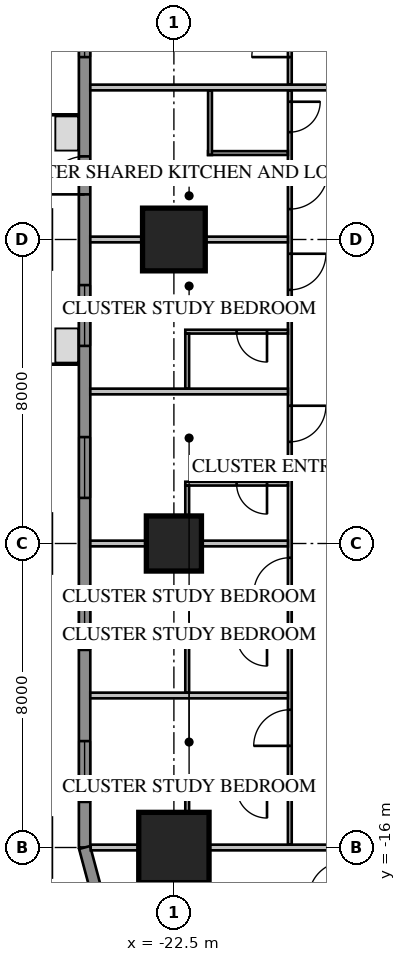
"""IFC4 building model, lengths in metres.
Left out: names, types, materials, properties, quantities, classifications, styles, units other than length and angle.
Written with IfcOpenShell. Run it as: python <this file> out.ifc"""

import sys

from ifc_helpers import new_model, si_unit, direction, frame, frame_2d, origin, origin_2d, place, context, subcontext, project, spatial, rectangle, extrude, element, fill, save


model = new_model("IFC4")
c1 = context("Model", 3, precision=1e-05, world=origin(), true_north=direction((0.0, 1.0)))
c2 = subcontext(c1, "Body", "Model", "MODEL_VIEW")
j1 = project(units=[si_unit("LENGTHUNIT", "METRE"), si_unit("PLANEANGLEUNIT", "RADIAN")], contexts=[c1])
p1 = place(None, origin())
s1 = spatial("IfcSite", under=j1, at=p1, CompositionType="ELEMENT")
p2 = place(p1, origin())
s2 = spatial("IfcBuilding", under=s1, at=p2, CompositionType="ELEMENT")
p3 = place(p2, frame((0.0, 0.0, 19.85)))
s3 = spatial("IfcBuildingStorey", under=s2, at=p3, CompositionType="ELEMENT", Elevation=19.85)
p4 = place(p3, frame((-22.5, 0.0, 0.0), z_axis=(0.0, 0.0, 1.0), x_axis=(1.0, 0.0, 0.0)))
e1 = element("IfcColumn", 1, at=p4, inside=s3, PredefinedType="COLUMN", context=c2, shape_type="SweptSolid", body=[
    extrude(rectangle(XDim=1.65, YDim=1.65, at=origin_2d()), origin(), (0.0, 0.0, 1.0), 3.85),
])
p5 = place(p3, frame((-22.5, -8.0, 0.0), z_axis=(0.0, 0.0, 1.0), x_axis=(1.0, 0.0, 0.0)))
e2 = element("IfcColumn", 2, at=p5, inside=s3, PredefinedType="COLUMN", context=c2, shape_type="SweptSolid", body=[
    extrude(rectangle(XDim=1.45, YDim=1.45, at=origin_2d()), origin(), (0.0, 0.0, 1.0), 3.85),
])
p6 = place(p3, frame((-22.5, -16.0, 0.0), z_axis=(0.0, 0.0, 1.0), x_axis=(1.0, 0.0, 0.0)))
e3 = element("IfcColumn", 3, at=p6, inside=s3, PredefinedType="COLUMN", context=c2, shape_type="SweptSolid", body=[
    extrude(rectangle(XDim=1.85, YDim=1.85, at=origin_2d()), origin(), (0.0, 0.0, 1.0), 3.85),
])
p7 = place(p3, frame((-24.85, 16.0, 0.0), z_axis=(0.0, 0.0, 1.0), x_axis=(0.0, -1.0, 0.0)))
e4 = element("IfcWall", 4, at=p7, inside=s3, PredefinedType="SOLIDWALL", context=c2, shape_type="SweptSolid", body=[
    extrude(rectangle(XDim=32.0, YDim=0.3, at=frame_2d((16.0, 0.0))), origin(), (0.0, 0.0, 1.0), 3.65),
])
p8 = place(p7, frame((1.2, 0.0, 0.75)))
e5 = element("IfcOpeningElement", 5, at=p8, cuts=e4, PredefinedType="OPENING", context=c2, shape_type="SweptSolid", body=[
    extrude(rectangle(XDim=1.6, YDim=1.8, at=frame_2d((0.8, 0.9))), frame((0.0, 0.17, 0.0), z_axis=(0.0, -1.0, 0.0), x_axis=(1.0, 0.0, 0.0)), (0.0, 0.0, 1.0), 0.34),
])
p9 = place(p7, frame((5.2, 0.0, 0.75)))
e6 = element("IfcOpeningElement", 6, at=p9, cuts=e4, PredefinedType="OPENING", context=c2, shape_type="SweptSolid", body=[
    extrude(rectangle(XDim=1.6, YDim=1.8, at=frame_2d((0.8, 0.9))), frame((0.0, 0.17, 0.0), z_axis=(0.0, -1.0, 0.0), x_axis=(1.0, 0.0, 0.0)), (0.0, 0.0, 1.0), 0.34),
])
p10 = place(p7, frame((17.2, 0.0, 0.75)))
e7 = element("IfcOpeningElement", 7, at=p10, cuts=e4, PredefinedType="OPENING", context=c2, shape_type="SweptSolid", body=[
    extrude(rectangle(XDim=1.6, YDim=1.8, at=frame_2d((0.8, 0.9))), frame((0.0, 0.17, 0.0), z_axis=(0.0, -1.0, 0.0), x_axis=(1.0, 0.0, 0.0)), (0.0, 0.0, 1.0), 0.34),
])
p11 = place(p7, frame((21.2, 0.0, 0.75)))
e8 = element("IfcOpeningElement", 8, at=p11, cuts=e4, PredefinedType="OPENING", context=c2, shape_type="SweptSolid", body=[
    extrude(rectangle(XDim=1.6, YDim=1.8, at=frame_2d((0.8, 0.9))), frame((0.0, 0.17, 0.0), z_axis=(0.0, -1.0, 0.0), x_axis=(1.0, 0.0, 0.0)), (0.0, 0.0, 1.0), 0.34),
])
p12 = place(p7, frame((25.2, 0.0, 0.75)))
e9 = element("IfcOpeningElement", 9, at=p12, cuts=e4, PredefinedType="OPENING", context=c2, shape_type="SweptSolid", body=[
    extrude(rectangle(XDim=1.6, YDim=1.8, at=frame_2d((0.8, 0.9))), frame((0.0, 0.17, 0.0), z_axis=(0.0, -1.0, 0.0), x_axis=(1.0, 0.0, 0.0)), (0.0, 0.0, 1.0), 0.34),
])
p13 = place(p7, frame((29.2, 0.0, 0.75)))
e10 = element("IfcOpeningElement", 10, at=p13, cuts=e4, PredefinedType="OPENING", context=c2, shape_type="SweptSolid", body=[
    extrude(rectangle(XDim=1.6, YDim=1.8, at=frame_2d((0.8, 0.9))), frame((0.0, 0.17, 0.0), z_axis=(0.0, -1.0, 0.0), x_axis=(1.0, 0.0, 0.0)), (0.0, 0.0, 1.0), 0.34),
])
p14 = place(p7, frame((8.8, 0.0, 0.75)))
e11 = element("IfcOpeningElement", 11, at=p14, cuts=e4, PredefinedType="OPENING", context=c2, shape_type="SweptSolid", body=[
    extrude(rectangle(XDim=2.4, YDim=1.8, at=frame_2d((1.2, 0.9))), frame((0.0, 0.17, 0.0), z_axis=(0.0, -1.0, 0.0), x_axis=(1.0, 0.0, 0.0)), (0.0, 0.0, 1.0), 0.34),
])
p15 = place(p7, frame((13.812, 0.0, 0.0)))
e12 = element("IfcOpeningElement", 12, at=p15, cuts=e4, PredefinedType="OPENING", context=c2, shape_type="SweptSolid", body=[
    extrude(rectangle(XDim=1.0, YDim=2.4, at=frame_2d((0.5, 1.2))), frame((0.0, 0.17, 0.0), z_axis=(0.0, -1.0, 0.0), x_axis=(1.0, 0.0, 0.0)), (0.0, 0.0, 1.0), 0.34),
])
p16 = place(p3, frame((-24.85, -16.0, 0.0), z_axis=(0.0, 0.0, 1.0), x_axis=(0.258839972501, -0.965920218567, 0.0)))
e13 = element("IfcWall", 13, at=p16, inside=s3, PredefinedType="SOLIDWALL", context=c2, shape_type="SweptSolid", body=[
    extrude(rectangle(XDim=4.581, YDim=0.3, at=frame_2d((2.291, 0.0))), origin(), (0.0, 0.0, 1.0), 3.65),
])
p17 = place(p3, frame((-19.45, 15.925, 0.0), z_axis=(0.0, 0.0, 1.0), x_axis=(0.0, -1.0, 0.0)))
e14 = element("IfcWall", 14, at=p17, inside=s3, PredefinedType="PARTITIONING", context=c2, shape_type="SweptSolid", body=[
    extrude(rectangle(XDim=11.85, YDim=0.1, at=frame_2d((5.925, 0.0))), origin(), (0.0, 0.0, 1.0), 3.65),
])
p18 = place(p17, frame((10.125, 0.0, 0.0)))
e15 = element("IfcOpeningElement", 15, at=p18, cuts=e14, PredefinedType="OPENING", context=c2, shape_type="SweptSolid", body=[
    extrude(rectangle(XDim=1.0, YDim=2.1, at=frame_2d((0.5, 1.05))), frame((0.0, 0.07, 0.0), z_axis=(0.0, -1.0, 0.0), x_axis=(1.0, 0.0, 0.0)), (0.0, 0.0, 1.0), 0.14),
])
p19 = place(p17, frame((8.3, 0.0, 0.0)))
e16 = element("IfcOpeningElement", 16, at=p19, cuts=e14, PredefinedType="OPENING", context=c2, shape_type="SweptSolid", body=[
    extrude(rectangle(XDim=0.8, YDim=2.1, at=frame_2d((0.4, 1.05))), frame((0.0, 0.07, 0.0), z_axis=(0.0, -1.0, 0.0), x_axis=(1.0, 0.0, 0.0)), (0.0, 0.0, 1.0), 0.14),
])
p20 = place(p17, frame((0.3, 0.0, 0.0)))
e17 = element("IfcOpeningElement", 17, at=p20, cuts=e14, PredefinedType="OPENING", context=c2, shape_type="SweptSolid", body=[
    extrude(rectangle(XDim=0.95, YDim=2.1, at=frame_2d((0.475, 1.05))), frame((0.0, 0.07, 0.0), z_axis=(0.0, -1.0, 0.0), x_axis=(1.0, 0.0, 0.0)), (0.0, 0.0, 1.0), 0.14),
])
p21 = place(p17, frame((4.3, 0.0, 0.0)))
e18 = element("IfcOpeningElement", 18, at=p21, cuts=e14, PredefinedType="OPENING", context=c2, shape_type="SweptSolid", body=[
    extrude(rectangle(XDim=0.95, YDim=2.1, at=frame_2d((0.475, 1.05))), frame((0.0, 0.07, 0.0), z_axis=(0.0, -1.0, 0.0), x_axis=(1.0, 0.0, 0.0)), (0.0, 0.0, 1.0), 0.14),
])
p22 = place(p3, frame((-19.45, 3.925, 0.0), z_axis=(0.0, 0.0, 1.0), x_axis=(0.0, -1.0, 0.0)))
e19 = element("IfcWall", 19, at=p22, inside=s3, PredefinedType="PARTITIONING", context=c2, shape_type="SweptSolid", body=[
    extrude(rectangle(XDim=19.85, YDim=0.1, at=frame_2d((9.925, 0.0))), origin(), (0.0, 0.0, 1.0), 3.65),
])
p23 = place(p22, frame((2.125, 0.0, 0.0)))
e20 = element("IfcOpeningElement", 20, at=p23, cuts=e19, PredefinedType="OPENING", context=c2, shape_type="SweptSolid", body=[
    extrude(rectangle(XDim=1.0, YDim=2.1, at=frame_2d((0.5, 1.05))), frame((0.0, 0.07, 0.0), z_axis=(0.0, -1.0, 0.0), x_axis=(1.0, 0.0, 0.0)), (0.0, 0.0, 1.0), 0.14),
])
p24 = place(p22, frame((0.3, 0.0, 0.0)))
e21 = element("IfcOpeningElement", 21, at=p24, cuts=e19, PredefinedType="OPENING", context=c2, shape_type="SweptSolid", body=[
    extrude(rectangle(XDim=0.8, YDim=2.1, at=frame_2d((0.4, 1.05))), frame((0.0, 0.07, 0.0), z_axis=(0.0, -1.0, 0.0), x_axis=(1.0, 0.0, 0.0)), (0.0, 0.0, 1.0), 0.14),
])
p25 = place(p22, frame((4.3, 0.0, 0.0)))
e22 = element("IfcOpeningElement", 22, at=p25, cuts=e19, PredefinedType="OPENING", context=c2, shape_type="SweptSolid", body=[
    extrude(rectangle(XDim=0.95, YDim=2.1, at=frame_2d((0.475, 1.05))), frame((0.0, 0.07, 0.0), z_axis=(0.0, -1.0, 0.0), x_axis=(1.0, 0.0, 0.0)), (0.0, 0.0, 1.0), 0.14),
])
p26 = place(p22, frame((8.3, 0.0, 0.0)))
e23 = element("IfcOpeningElement", 23, at=p26, cuts=e19, PredefinedType="OPENING", context=c2, shape_type="SweptSolid", body=[
    extrude(rectangle(XDim=0.95, YDim=2.1, at=frame_2d((0.475, 1.05))), frame((0.0, 0.07, 0.0), z_axis=(0.0, -1.0, 0.0), x_axis=(1.0, 0.0, 0.0)), (0.0, 0.0, 1.0), 0.14),
])
p27 = place(p22, frame((12.3, 0.0, 0.0)))
e24 = element("IfcOpeningElement", 24, at=p27, cuts=e19, PredefinedType="OPENING", context=c2, shape_type="SweptSolid", body=[
    extrude(rectangle(XDim=0.95, YDim=2.1, at=frame_2d((0.475, 1.05))), frame((0.0, 0.07, 0.0), z_axis=(0.0, -1.0, 0.0), x_axis=(1.0, 0.0, 0.0)), (0.0, 0.0, 1.0), 0.14),
])
p28 = place(p22, frame((16.3, 0.0, 0.0)))
e25 = element("IfcOpeningElement", 25, at=p28, cuts=e19, PredefinedType="OPENING", context=c2, shape_type="SweptSolid", body=[
    extrude(rectangle(XDim=0.95, YDim=2.1, at=frame_2d((0.475, 1.05))), frame((0.0, 0.07, 0.0), z_axis=(0.0, -1.0, 0.0), x_axis=(1.0, 0.0, 0.0)), (0.0, 0.0, 1.0), 0.14),
])
p29 = place(p3, frame((-19.5, 2.275, 0.0), z_axis=(0.0, 0.0, 1.0), x_axis=(-1.0, 0.0, 0.0)))
e26 = element("IfcWall", 26, at=p29, inside=s3, PredefinedType="PARTITIONING", context=c2, shape_type="SweptSolid", body=[
    extrude(rectangle(XDim=2.1, YDim=0.1, at=frame_2d((1.05, 0.0))), origin(), (0.0, 0.0, 1.0), 3.65),
])
p30 = place(p3, frame((-21.55, 3.925, 0.0), z_axis=(0.0, 0.0, 1.0), x_axis=(0.0, -1.0, 0.0)))
e27 = element("IfcWall", 27, at=p30, inside=s3, PredefinedType="PARTITIONING", context=c2, shape_type="SweptSolid", body=[
    extrude(rectangle(XDim=1.7, YDim=0.1, at=frame_2d((0.85, 0.0))), origin(), (0.0, 0.0, 1.0), 3.65),
])
p31 = place(p3, frame((-18.1, 4.0, 0.0), z_axis=(0.0, 0.0, 1.0), x_axis=(-1.0, 0.0, 0.0)))
e28 = element("IfcWall", 28, at=p31, inside=s3, PredefinedType="PARTITIONING", context=c2, shape_type="SweptSolid", body=[
    extrude(rectangle(XDim=6.6, YDim=0.15, at=frame_2d((3.3, 0.0))), origin(), (0.0, 0.0, 1.0), 3.65),
])
p32 = place(p3, frame((-19.5, 0.0, 0.0), z_axis=(0.0, 0.0, 1.0), x_axis=(-1.0, 0.0, 0.0)))
e29 = element("IfcWall", 29, at=p32, inside=s3, PredefinedType="PARTITIONING", context=c2, shape_type="SweptSolid", body=[
    extrude(rectangle(XDim=5.2, YDim=0.15, at=frame_2d((2.6, 0.0))), origin(), (0.0, 0.0, 1.0), 2.957),
])
for number, where, z_axis, x_axis in (
    (30, (-19.5, -4.0, 0.0), (0.0, 0.0, 1.0), (-1.0, 0.0, 0.0)),
    (31, (-19.5, -8.0, 0.0), (0.0, 0.0, 1.0), (-1.0, 0.0, 0.0)),
    (32, (-19.5, -12.0, 0.0), (0.0, 0.0, 1.0), (-1.0, 0.0, 0.0)),
):
    element("IfcWall", number, at=place(p3, frame(where, z_axis=z_axis, x_axis=x_axis)), inside=s3, PredefinedType="PARTITIONING", context=c2, shape_type="SweptSolid", body=[
        extrude(rectangle(XDim=5.2, YDim=0.15, at=frame_2d((2.6, 0.0))), origin(), (0.0, 0.0, 1.0), 3.65),
    ])
p33 = place(p3, frame((-18.1, -16.0, 0.0), z_axis=(0.0, 0.0, 1.0), x_axis=(-1.0, 0.0, 0.0)))
e33 = element("IfcWall", 33, at=p33, inside=s3, PredefinedType="PARTITIONING", context=c2, shape_type="SweptSolid", body=[
    extrude(rectangle(XDim=6.589, YDim=0.15, at=frame_2d((3.295, 0.0))), origin(), (0.0, 0.0, 1.0), 3.65),
])
p34 = place(p3, frame((-19.5, -2.425, 0.0), z_axis=(0.0, 0.0, 1.0), x_axis=(-1.0, 0.0, 0.0)))
e34 = element("IfcWall", 34, at=p34, inside=s3, PredefinedType="PARTITIONING", context=c2, shape_type="SweptSolid", body=[
    extrude(rectangle(XDim=2.7, YDim=0.1, at=frame_2d((1.35, 0.0))), origin(), (0.0, 0.0, 1.0), 3.65),
])
p35 = place(p34, frame((0.55, 0.0, 0.0)))
e35 = element("IfcOpeningElement", 35, at=p35, cuts=e34, PredefinedType="OPENING", context=c2, shape_type="SweptSolid", body=[
    extrude(rectangle(XDim=0.8, YDim=2.1, at=frame_2d((0.4, 1.05))), frame((0.0, 0.07, 0.0), z_axis=(0.0, -1.0, 0.0), x_axis=(1.0, 0.0, 0.0)), (0.0, 0.0, 1.0), 0.14),
])
p36 = place(p3, frame((-22.15, -2.475, 0.0), z_axis=(0.0, 0.0, 1.0), x_axis=(0.0, -1.0, 0.0)))
e36 = element("IfcWall", 36, at=p36, inside=s3, PredefinedType="PARTITIONING", context=c2, shape_type="SweptSolid", body=[
    extrude(rectangle(XDim=1.45, YDim=0.1, at=frame_2d((0.725, 0.0))), origin(), (0.0, 0.0, 1.0), 3.65),
])
p37 = place(p3, frame((-19.5, -6.425, 0.0), z_axis=(0.0, 0.0, 1.0), x_axis=(-1.0, 0.0, 0.0)))
e37 = element("IfcWall", 37, at=p37, inside=s3, PredefinedType="PARTITIONING", context=c2, shape_type="SweptSolid", body=[
    extrude(rectangle(XDim=2.7, YDim=0.1, at=frame_2d((1.35, 0.0))), origin(), (0.0, 0.0, 1.0), 3.65),
])
p38 = place(p37, frame((0.55, 0.0, 0.0)))
e38 = element("IfcOpeningElement", 38, at=p38, cuts=e37, PredefinedType="OPENING", context=c2, shape_type="SweptSolid", body=[
    extrude(rectangle(XDim=0.8, YDim=2.1, at=frame_2d((0.4, 1.05))), frame((0.0, 0.07, 0.0), z_axis=(0.0, -1.0, 0.0), x_axis=(1.0, 0.0, 0.0)), (0.0, 0.0, 1.0), 0.14),
])
p39 = place(p3, frame((-22.15, -6.475, 0.0), z_axis=(0.0, 0.0, 1.0), x_axis=(0.0, -1.0, 0.0)))
e39 = element("IfcWall", 39, at=p39, inside=s3, PredefinedType="PARTITIONING", context=c2, shape_type="SweptSolid", body=[
    extrude(rectangle(XDim=1.45, YDim=0.1, at=frame_2d((0.725, 0.0))), origin(), (0.0, 0.0, 1.0), 3.65),
])
p40 = place(p3, frame((-19.5, -10.425, 0.0), z_axis=(0.0, 0.0, 1.0), x_axis=(-1.0, 0.0, 0.0)))
e40 = element("IfcWall", 40, at=p40, inside=s3, PredefinedType="PARTITIONING", context=c2, shape_type="SweptSolid", body=[
    extrude(rectangle(XDim=2.7, YDim=0.1, at=frame_2d((1.35, 0.0))), origin(), (0.0, 0.0, 1.0), 3.65),
])
p41 = place(p40, frame((0.55, 0.0, 0.0)))
e41 = element("IfcOpeningElement", 41, at=p41, cuts=e40, PredefinedType="OPENING", context=c2, shape_type="SweptSolid", body=[
    extrude(rectangle(XDim=0.8, YDim=2.1, at=frame_2d((0.4, 1.05))), frame((0.0, 0.07, 0.0), z_axis=(0.0, -1.0, 0.0), x_axis=(1.0, 0.0, 0.0)), (0.0, 0.0, 1.0), 0.14),
])
p42 = place(p3, frame((-22.15, -10.475, 0.0), z_axis=(0.0, 0.0, 1.0), x_axis=(0.0, -1.0, 0.0)))
e42 = element("IfcWall", 42, at=p42, inside=s3, PredefinedType="PARTITIONING", context=c2, shape_type="SweptSolid", body=[
    extrude(rectangle(XDim=1.45, YDim=0.1, at=frame_2d((0.725, 0.0))), origin(), (0.0, 0.0, 1.0), 3.65),
])
p43 = place(p3, frame((-19.5, -14.425, 0.0), z_axis=(0.0, 0.0, 1.0), x_axis=(-1.0, 0.0, 0.0)))
e43 = element("IfcWall", 43, at=p43, inside=s3, PredefinedType="PARTITIONING", context=c2, shape_type="SweptSolid", body=[
    extrude(rectangle(XDim=2.7, YDim=0.1, at=frame_2d((1.35, 0.0))), origin(), (0.0, 0.0, 1.0), 3.65),
])
p44 = place(p43, frame((0.55, 0.0, 0.0)))
e44 = element("IfcOpeningElement", 44, at=p44, cuts=e43, PredefinedType="OPENING", context=c2, shape_type="SweptSolid", body=[
    extrude(rectangle(XDim=0.8, YDim=2.1, at=frame_2d((0.4, 1.05))), frame((0.0, 0.07, 0.0), z_axis=(0.0, -1.0, 0.0), x_axis=(1.0, 0.0, 0.0)), (0.0, 0.0, 1.0), 0.14),
])
p45 = place(p3, frame((-22.15, -14.475, 0.0), z_axis=(0.0, 0.0, 1.0), x_axis=(0.0, -1.0, 0.0)))
e45 = element("IfcWall", 45, at=p45, inside=s3, PredefinedType="PARTITIONING", context=c2, shape_type="SweptSolid", body=[
    extrude(rectangle(XDim=1.45, YDim=0.1, at=frame_2d((0.725, 0.0))), origin(), (0.0, 0.0, 1.0), 3.65),
])
p46 = place(p10, origin())
e46 = element("IfcWindow", 46, at=p46, inside=s3, PartitioningType="SINGLE_PANEL", PredefinedType="WINDOW", context=c2, shape_type="SweptSolid", body=[
    extrude(rectangle(XDim=1.6, YDim=1.8, at=frame_2d((0.8, 0.9))), frame((0.0, 0.03, 0.0), z_axis=(0.0, -1.0, 0.0), x_axis=(1.0, 0.0, 0.0)), (0.0, 0.0, 1.0), 0.06),
])
fill(e7, e46)
p47 = place(p11, origin())
e47 = element("IfcWindow", 47, at=p47, inside=s3, PartitioningType="SINGLE_PANEL", PredefinedType="WINDOW", context=c2, shape_type="SweptSolid", body=[
    extrude(rectangle(XDim=1.6, YDim=1.8, at=frame_2d((0.8, 0.9))), frame((0.0, 0.03, 0.0), z_axis=(0.0, -1.0, 0.0), x_axis=(1.0, 0.0, 0.0)), (0.0, 0.0, 1.0), 0.06),
])
fill(e8, e47)
p48 = place(p12, origin())
e48 = element("IfcWindow", 48, at=p48, inside=s3, PartitioningType="SINGLE_PANEL", PredefinedType="WINDOW", context=c2, shape_type="SweptSolid", body=[
    extrude(rectangle(XDim=1.6, YDim=1.8, at=frame_2d((0.8, 0.9))), frame((0.0, 0.03, 0.0), z_axis=(0.0, -1.0, 0.0), x_axis=(1.0, 0.0, 0.0)), (0.0, 0.0, 1.0), 0.06),
])
fill(e9, e48)
p49 = place(p13, origin())
e49 = element("IfcWindow", 49, at=p49, inside=s3, PartitioningType="SINGLE_PANEL", PredefinedType="WINDOW", context=c2, shape_type="SweptSolid", body=[
    extrude(rectangle(XDim=1.6, YDim=1.8, at=frame_2d((0.8, 0.9))), frame((0.0, 0.03, 0.0), z_axis=(0.0, -1.0, 0.0), x_axis=(1.0, 0.0, 0.0)), (0.0, 0.0, 1.0), 0.06),
])
fill(e10, e49)
p50 = place(p14, origin())
e50 = element("IfcWindow", 50, at=p50, inside=s3, PartitioningType="SINGLE_PANEL", PredefinedType="WINDOW", context=c2, shape_type="SweptSolid", body=[
    extrude(rectangle(XDim=2.4, YDim=1.8, at=frame_2d((1.2, 0.9))), frame((0.0, 0.03, 0.0), z_axis=(0.0, -1.0, 0.0), x_axis=(1.0, 0.0, 0.0)), (0.0, 0.0, 1.0), 0.06),
])
fill(e11, e50)
p51 = place(p15, origin())
e51 = element("IfcDoor", 51, at=p51, inside=s3, OperationType="SINGLE_SWING_RIGHT", PredefinedType="DOOR", context=c2, shape_type="SweptSolid", body=[
    extrude(rectangle(XDim=1.0, YDim=2.4, at=frame_2d((0.5, 1.2))), frame((0.0, 0.025, 0.0), z_axis=(0.0, -1.0, 0.0), x_axis=(1.0, 0.0, 0.0)), (0.0, 0.0, 1.0), 0.05),
])
fill(e12, e51)
p52 = place(p18, origin())
e52 = element("IfcDoor", 52, at=p52, inside=s3, OperationType="SINGLE_SWING_RIGHT", PredefinedType="DOOR", context=c2, shape_type="SweptSolid", body=[
    extrude(rectangle(XDim=1.0, YDim=2.1, at=frame_2d((0.5, 1.05))), frame((0.0, 0.025, 0.0), z_axis=(0.0, -1.0, 0.0), x_axis=(1.0, 0.0, 0.0)), (0.0, 0.0, 1.0), 0.05),
])
fill(e15, e52)
p53 = place(p23, origin())
e53 = element("IfcDoor", 53, at=p53, inside=s3, OperationType="SINGLE_SWING_LEFT", PredefinedType="DOOR", context=c2, shape_type="SweptSolid", body=[
    extrude(rectangle(XDim=1.0, YDim=2.1, at=frame_2d((0.5, 1.05))), frame((0.0, 0.025, 0.0), z_axis=(0.0, -1.0, 0.0), x_axis=(1.0, 0.0, 0.0)), (0.0, 0.0, 1.0), 0.05),
])
fill(e20, e53)
p54 = place(p24, origin())
e54 = element("IfcDoor", 54, at=p54, inside=s3, OperationType="SINGLE_SWING_LEFT", PredefinedType="DOOR", context=c2, shape_type="SweptSolid", body=[
    extrude(rectangle(XDim=0.8, YDim=2.1, at=frame_2d((0.4, 1.05))), frame((0.0, 0.025, 0.0), z_axis=(0.0, -1.0, 0.0), x_axis=(1.0, 0.0, 0.0)), (0.0, 0.0, 1.0), 0.05),
])
fill(e21, e54)
p55 = place(p25, origin())
e55 = element("IfcDoor", 55, at=p55, inside=s3, OperationType="SINGLE_SWING_LEFT", PredefinedType="DOOR", context=c2, shape_type="SweptSolid", body=[
    extrude(rectangle(XDim=0.95, YDim=2.1, at=frame_2d((0.475, 1.05))), frame((0.0, 0.025, 0.0), z_axis=(0.0, -1.0, 0.0), x_axis=(1.0, 0.0, 0.0)), (0.0, 0.0, 1.0), 0.05),
])
fill(e22, e55)
p56 = place(p35, origin())
e56 = element("IfcDoor", 56, at=p56, inside=s3, OperationType="SINGLE_SWING_LEFT", PredefinedType="DOOR", context=c2, shape_type="SweptSolid", body=[
    extrude(rectangle(XDim=0.8, YDim=2.1, at=frame_2d((0.4, 1.05))), frame((0.0, 0.025, 0.0), z_axis=(0.0, -1.0, 0.0), x_axis=(1.0, 0.0, 0.0)), (0.0, 0.0, 1.0), 0.05),
])
fill(e35, e56)
p57 = place(p26, origin())
e57 = element("IfcDoor", 57, at=p57, inside=s3, OperationType="SINGLE_SWING_LEFT", PredefinedType="DOOR", context=c2, shape_type="SweptSolid", body=[
    extrude(rectangle(XDim=0.95, YDim=2.1, at=frame_2d((0.475, 1.05))), frame((0.0, 0.025, 0.0), z_axis=(0.0, -1.0, 0.0), x_axis=(1.0, 0.0, 0.0)), (0.0, 0.0, 1.0), 0.05),
])
fill(e23, e57)
p58 = place(p38, origin())
e58 = element("IfcDoor", 58, at=p58, inside=s3, OperationType="SINGLE_SWING_LEFT", PredefinedType="DOOR", context=c2, shape_type="SweptSolid", body=[
    extrude(rectangle(XDim=0.8, YDim=2.1, at=frame_2d((0.4, 1.05))), frame((0.0, 0.025, 0.0), z_axis=(0.0, -1.0, 0.0), x_axis=(1.0, 0.0, 0.0)), (0.0, 0.0, 1.0), 0.05),
])
fill(e38, e58)
p59 = place(p27, origin())
e59 = element("IfcDoor", 59, at=p59, inside=s3, OperationType="SINGLE_SWING_RIGHT", PredefinedType="DOOR", context=c2, shape_type="SweptSolid", body=[
    extrude(rectangle(XDim=0.95, YDim=2.1, at=frame_2d((0.475, 1.05))), frame((0.0, 0.025, 0.0), z_axis=(0.0, -1.0, 0.0), x_axis=(1.0, 0.0, 0.0)), (0.0, 0.0, 1.0), 0.05),
])
fill(e24, e59)
p60 = place(p41, origin())
e60 = element("IfcDoor", 60, at=p60, inside=s3, OperationType="SINGLE_SWING_LEFT", PredefinedType="DOOR", context=c2, shape_type="SweptSolid", body=[
    extrude(rectangle(XDim=0.8, YDim=2.1, at=frame_2d((0.4, 1.05))), frame((0.0, 0.025, 0.0), z_axis=(0.0, -1.0, 0.0), x_axis=(1.0, 0.0, 0.0)), (0.0, 0.0, 1.0), 0.05),
])
fill(e41, e60)
p61 = place(p28, origin())
e61 = element("IfcDoor", 61, at=p61, inside=s3, OperationType="SINGLE_SWING_RIGHT", PredefinedType="DOOR", context=c2, shape_type="SweptSolid", body=[
    extrude(rectangle(XDim=0.95, YDim=2.1, at=frame_2d((0.475, 1.05))), frame((0.0, 0.025, 0.0), z_axis=(0.0, -1.0, 0.0), x_axis=(1.0, 0.0, 0.0)), (0.0, 0.0, 1.0), 0.05),
])
fill(e25, e61)
p62 = place(p44, origin())
e62 = element("IfcDoor", 62, at=p62, inside=s3, OperationType="SINGLE_SWING_LEFT", PredefinedType="DOOR", context=c2, shape_type="SweptSolid", body=[
    extrude(rectangle(XDim=0.8, YDim=2.1, at=frame_2d((0.4, 1.05))), frame((0.0, 0.025, 0.0), z_axis=(0.0, -1.0, 0.0), x_axis=(1.0, 0.0, 0.0)), (0.0, 0.0, 1.0), 0.05),
])
fill(e44, e62)
save(model, sys.argv[1])
